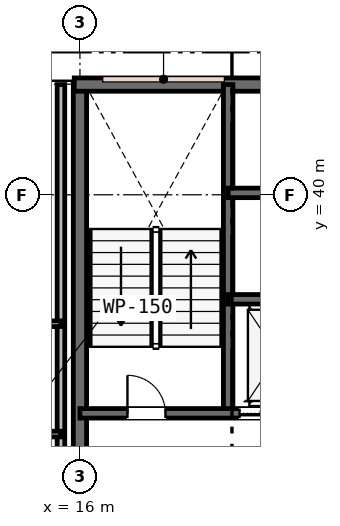
"""IFC4 building model, lengths in metres.
Left out: names, types, materials, properties, quantities, classifications, styles, units other than length and angle.
Written with IfcOpenShell. Run it as: python <this file> out.ifc"""

import sys

from ifc_helpers import new_model, si_unit, direction, frame, frame_2d, origin, place, context, subcontext, project, spatial, rectangle, extrude, element, fill, save


model = new_model("IFC4")
c1 = context("Model", 3, precision=1e-05, world=origin(), true_north=direction((0.0, 1.0)))
c2 = subcontext(c1, "Body", "Model", "MODEL_VIEW")
j1 = project(units=[si_unit("LENGTHUNIT", "METRE"), si_unit("PLANEANGLEUNIT", "RADIAN")], contexts=[c1])
p1 = place(None, origin())
s1 = spatial("IfcSite", under=j1, at=p1, CompositionType="ELEMENT")
p2 = place(p1, origin())
s2 = spatial("IfcBuilding", under=s1, at=p2, CompositionType="ELEMENT")
p3 = place(p2, frame((0.0, 0.0, 157.8)))
s3 = spatial("IfcBuildingStorey", under=s2, at=p3, CompositionType="ELEMENT", Elevation=157.8)
p4 = place(p3, frame((16.0, 30.65, 0.0), z_axis=(0.0, 0.0, 1.0), x_axis=(0.0, 1.0, 0.0)))
e1 = element("IfcWall", 1, at=p4, inside=s3, PredefinedType="SHEAR", context=c2, shape_type="SweptSolid", body=[
    extrude(rectangle(XDim=12.3, YDim=0.35, at=frame_2d((6.15, 0.0))), origin(), (0.0, 0.0, 1.0), 3.6),
])
p5 = place(p3, frame((15.85, 42.9, 0.0), z_axis=(0.0, 0.0, 1.0), x_axis=(1.0, 0.0, 0.0)))
e2 = element("IfcWall", 2, at=p5, inside=s3, PredefinedType="SHEAR", context=c2, shape_type="SweptSolid", body=[
    extrude(rectangle(XDim=24.3, YDim=0.35, at=frame_2d((12.15, 0.0))), origin(), (0.0, 0.0, 1.0), 3.6),
])
p6 = place(p3, frame((19.9, 34.25, 0.0), z_axis=(0.0, 0.0, 1.0), x_axis=(0.0, 1.0, 0.0)))
e3 = element("IfcWall", 3, at=p6, inside=s3, PredefinedType="SHEAR", context=c2, shape_type="SweptSolid", body=[
    extrude(rectangle(XDim=8.65, YDim=0.25, at=frame_2d((4.325, 0.0))), origin(), (0.0, 0.0, 1.0), 3.6),
])
p7 = place(p3, frame((16.0, 34.25, 0.0), z_axis=(0.0, 0.0, 1.0), x_axis=(1.0, 0.0, 0.0)))
e4 = element("IfcWall", 4, at=p7, inside=s3, PredefinedType="SHEAR", context=c2, shape_type="SweptSolid", body=[
    extrude(rectangle(XDim=6.05, YDim=0.25, at=frame_2d((3.025, 0.0))), origin(), (0.0, 0.0, 1.0), 3.6),
])
p8 = place(p7, frame((1.25, 0.0, 0.0)))
e5 = element("IfcOpeningElement", 5, at=p8, cuts=e4, PredefinedType="OPENING", context=c2, shape_type="SweptSolid", body=[
    extrude(rectangle(XDim=1.0, YDim=2.15, at=frame_2d((0.5, 1.075))), frame((0.0, 0.135, 0.0), z_axis=(0.0, -1.0, 0.0), x_axis=(1.0, 0.0, 0.0)), (0.0, 0.0, 1.0), 0.27),
])
p9 = place(p7, frame((4.2, 0.0, 0.0)))
e6 = element("IfcOpeningElement", 6, at=p9, cuts=e4, PredefinedType="OPENING", context=c2, shape_type="SweptSolid", body=[
    extrude(rectangle(XDim=1.1, YDim=2.15, at=frame_2d((0.55, 1.075))), frame((0.0, 0.135, 0.0), z_axis=(0.0, -1.0, 0.0), x_axis=(1.0, 0.0, 0.0)), (0.0, 0.0, 1.0), 0.27),
])
p10 = place(p3, frame((19.9, 37.25, 0.0), z_axis=(0.0, 0.0, 1.0), x_axis=(1.0, 0.0, 0.0)))
e7 = element("IfcWall", 7, at=p10, inside=s3, PredefinedType="SHEAR", context=c2, shape_type="SweptSolid", body=[
    extrude(rectangle(XDim=16.2, YDim=0.25, at=frame_2d((8.1, 0.0))), origin(), (0.0, 0.0, 1.0), 3.6),
])
p11 = place(p10, frame((12.55, 0.0, 0.0)))
e8 = element("IfcOpeningElement", 8, at=p11, cuts=e7, PredefinedType="OPENING", context=c2, shape_type="SweptSolid", body=[
    extrude(rectangle(XDim=0.9, YDim=2.15, at=frame_2d((0.45, 1.075))), frame((0.0, 0.135, 0.0), z_axis=(0.0, -1.0, 0.0), x_axis=(1.0, 0.0, 0.0)), (0.0, 0.0, 1.0), 0.27),
])
p12 = place(p10, frame((2.5, 0.0, 0.0)))
e9 = element("IfcOpeningElement", 9, at=p12, cuts=e7, PredefinedType="OPENING", context=c2, shape_type="SweptSolid", body=[
    extrude(rectangle(XDim=1.05, YDim=2.15, at=frame_2d((0.525, 1.075))), frame((0.0, 0.135, 0.0), z_axis=(0.0, -1.0, 0.0), x_axis=(1.0, 0.0, 0.0)), (0.0, 0.0, 1.0), 0.27),
])
p13 = place(p10, frame((4.4, 0.0, 0.0)))
e10 = element("IfcOpeningElement", 10, at=p13, cuts=e7, PredefinedType="OPENING", context=c2, shape_type="SweptSolid", body=[
    extrude(rectangle(XDim=1.05, YDim=2.15, at=frame_2d((0.525, 1.075))), frame((0.0, 0.135, 0.0), z_axis=(0.0, -1.0, 0.0), x_axis=(1.0, 0.0, 0.0)), (0.0, 0.0, 1.0), 0.27),
])
p14 = place(p10, frame((6.3, 0.0, 0.0)))
e11 = element("IfcOpeningElement", 11, at=p14, cuts=e7, PredefinedType="OPENING", context=c2, shape_type="SweptSolid", body=[
    extrude(rectangle(XDim=1.05, YDim=2.15, at=frame_2d((0.525, 1.075))), frame((0.0, 0.135, 0.0), z_axis=(0.0, -1.0, 0.0), x_axis=(1.0, 0.0, 0.0)), (0.0, 0.0, 1.0), 0.27),
])
p15 = place(p3, frame((19.9, 40.05, 0.0), z_axis=(0.0, 0.0, 1.0), x_axis=(1.0, 0.0, 0.0)))
e12 = element("IfcWall", 12, at=p15, inside=s3, PredefinedType="SHEAR", context=c2, shape_type="SweptSolid", body=[
    extrude(rectangle(XDim=12.05, YDim=0.25, at=frame_2d((6.025, 0.0))), origin(), (0.0, 0.0, 1.0), 3.6),
])
p16 = place(p3, frame((15.5, 28.6, 0.0), z_axis=(0.0, 0.0, 1.0), x_axis=(0.0, 1.0, 0.0)))
e13 = element("IfcWall", 13, at=p16, inside=s3, PredefinedType="PARTITIONING", context=c2, shape_type="SweptSolid", body=[
    extrude(rectangle(XDim=14.3, YDim=0.2, at=frame_2d((7.15, 0.0))), origin(), (0.0, 0.0, 1.0), 2.93),
])
p17 = place(p16, frame((0.625, 0.0, 0.0)))
e14 = element("IfcOpeningElement", 14, at=p17, cuts=e13, PredefinedType="OPENING", context=c2, shape_type="SweptSolid", body=[
    extrude(rectangle(XDim=0.95, YDim=2.15, at=frame_2d((0.475, 1.075))), frame((0.0, 0.11, 0.0), z_axis=(0.0, -1.0, 0.0), x_axis=(1.0, 0.0, 0.0)), (0.0, 0.0, 1.0), 0.22),
])
p18 = place(p3, frame((12.9, 33.704, 0.0), z_axis=(0.0, 0.0, 1.0), x_axis=(1.0, 0.0, 0.0)))
e15 = element("IfcWall", 15, at=p18, inside=s3, PredefinedType="PARTITIONING", context=c2, shape_type="SweptSolid", body=[
    extrude(rectangle(XDim=2.6, YDim=0.15, at=frame_2d((1.3, 0.0))), origin(), (0.0, 0.0, 1.0), 3.33),
])
p19 = place(p3, frame((5.1, 36.608, 0.0), z_axis=(0.0, 0.0, 1.0), x_axis=(1.0, 0.0, 0.0)))
e16 = element("IfcWall", 16, at=p19, inside=s3, PredefinedType="PARTITIONING", context=c2, shape_type="SweptSolid", body=[
    extrude(rectangle(XDim=10.4, YDim=0.15, at=frame_2d((5.2, 0.0))), origin(), (0.0, 0.0, 1.0), 3.01),
])
p20 = place(p19, frame((2.15, 0.0, 0.0)))
e17 = element("IfcOpeningElement", 17, at=p20, cuts=e16, PredefinedType="OPENING", context=c2, shape_type="SweptSolid", body=[
    extrude(rectangle(XDim=0.9, YDim=2.15, at=frame_2d((0.45, 1.075))), frame((0.0, 0.085, 0.0), z_axis=(0.0, -1.0, 0.0), x_axis=(1.0, 0.0, 0.0)), (0.0, 0.0, 1.0), 0.17),
])
p21 = place(p19, frame((6.05, 0.0, 0.0)))
e18 = element("IfcOpeningElement", 18, at=p21, cuts=e16, PredefinedType="OPENING", context=c2, shape_type="SweptSolid", body=[
    extrude(rectangle(XDim=0.9, YDim=2.15, at=frame_2d((0.45, 1.075))), frame((0.0, 0.085, 0.0), z_axis=(0.0, -1.0, 0.0), x_axis=(1.0, 0.0, 0.0)), (0.0, 0.0, 1.0), 0.17),
])
p22 = place(p8, origin())
e19 = element("IfcDoor", 19, at=p22, inside=s3, OperationType="SINGLE_SWING_LEFT", PredefinedType="DOOR", context=c2, shape_type="SweptSolid", body=[
    extrude(rectangle(XDim=1.0, YDim=2.15, at=frame_2d((0.5, 1.075))), frame((0.0, 0.025, 0.0), z_axis=(0.0, -1.0, 0.0), x_axis=(1.0, 0.0, 0.0)), (0.0, 0.0, 1.0), 0.05),
])
fill(e5, e19)
p23 = place(p9, origin())
e20 = element("IfcDoor", 20, at=p23, inside=s3, OperationType="DOUBLE_DOOR_SLIDING", PredefinedType="DOOR", context=c2, shape_type="SweptSolid", body=[
    extrude(rectangle(XDim=1.1, YDim=2.15, at=frame_2d((0.55, 1.075))), frame((0.0, 0.025, 0.0), z_axis=(0.0, -1.0, 0.0), x_axis=(1.0, 0.0, 0.0)), (0.0, 0.0, 1.0), 0.05),
])
fill(e6, e20)
save(model, sys.argv[1])
